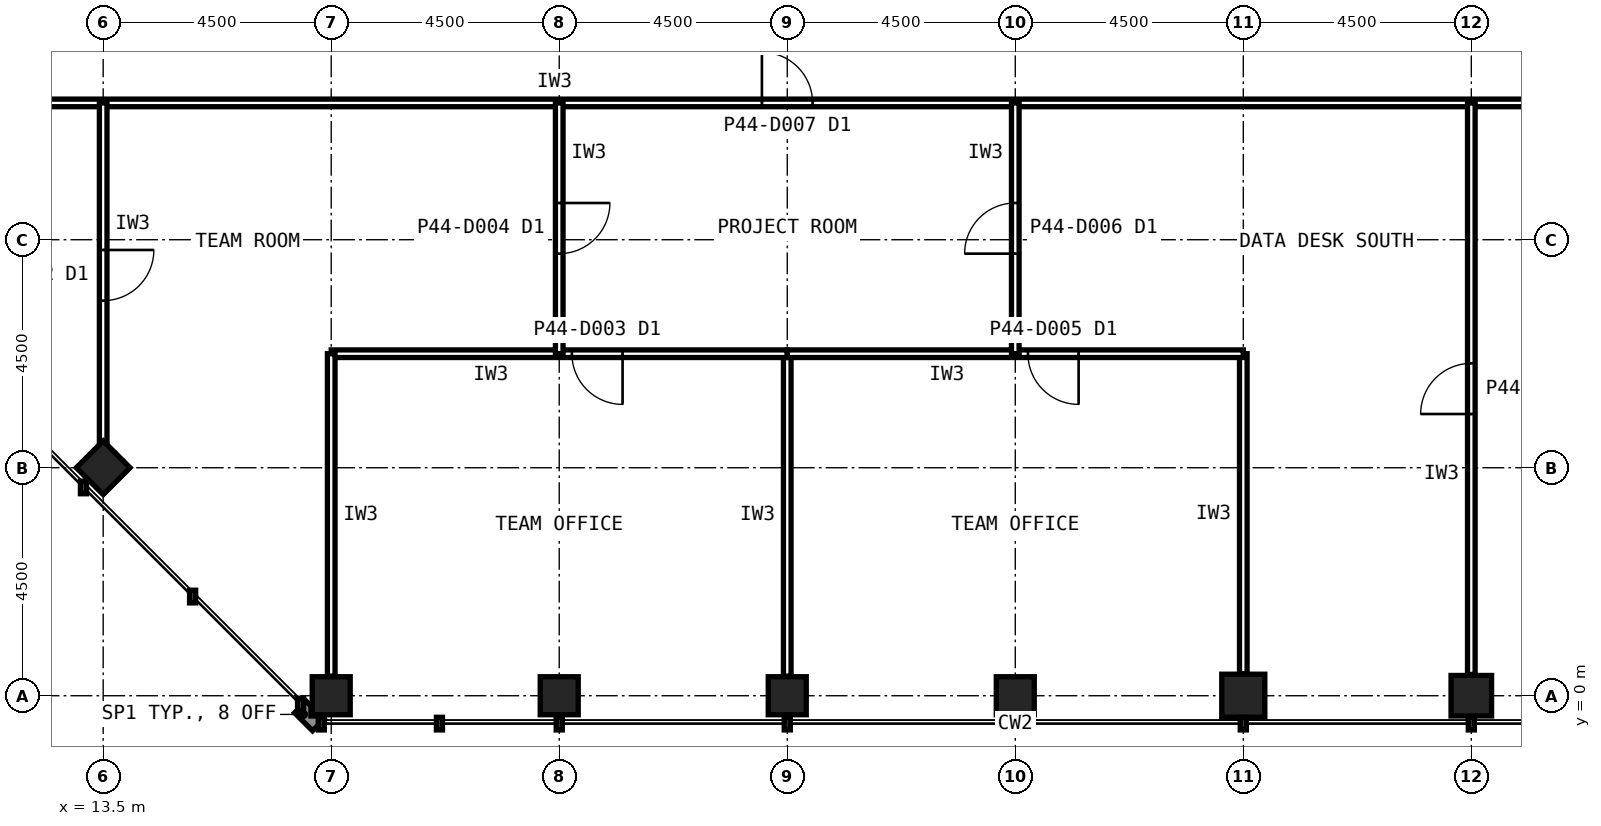
"""IFC4 building model, lengths in metres.
Left out: names, types, materials, properties, quantities, classifications, styles, units other than length and angle.
Written with IfcOpenShell. Run it as: python <this file> out.ifc"""

import sys

from ifc_helpers import new_model, si_unit, direction, frame, frame_2d, origin, origin_2d, place, context, subcontext, project, spatial, rectangle, hollow_rectangle, extrude, element, fill, save


model = new_model("IFC4")
c1 = context("Model", 3, precision=1e-05, world=origin(), true_north=direction((0.0, 1.0)))
c2 = subcontext(c1, "Body", "Model", "MODEL_VIEW")
j1 = project(units=[si_unit("LENGTHUNIT", "METRE"), si_unit("PLANEANGLEUNIT", "RADIAN")], contexts=[c1])
p1 = place(None, origin())
s1 = spatial("IfcSite", under=j1, at=p1, CompositionType="ELEMENT")
p2 = place(p1, origin())
s2 = spatial("IfcBuilding", under=s1, at=p2, CompositionType="ELEMENT")
p3 = place(p2, frame((0.0, 0.0, 183.6)))
s3 = spatial("IfcBuildingStorey", under=s2, at=p3, CompositionType="ELEMENT", Elevation=183.6)
for number, where, z_axis, x_axis in (
    (1, (18.0, 0.0, 0.0), (0.0, 0.0, 1.0), (1.0, 0.0, 0.0)),
    (2, (22.5, 0.0, 0.0), (0.0, 0.0, 1.0), (1.0, 0.0, 0.0)),
    (3, (27.0, 0.0, 0.0), (0.0, 0.0, 1.0), (1.0, 0.0, 0.0)),
    (4, (31.5, 0.0, 0.0), (0.0, 0.0, 1.0), (1.0, 0.0, 0.0)),
):
    element("IfcColumn", number, at=place(p3, frame(where, z_axis=z_axis, x_axis=x_axis)), inside=s3, PredefinedType="COLUMN", context=c2, shape_type="SweptSolid", body=[
        extrude(hollow_rectangle(XDim=0.7, YDim=0.7, WallThickness=0.036, at=origin_2d()), origin(), (0.0, 0.0, 1.0), 4.0),
    ])
p4 = place(p3, frame((36.0, 0.0, 0.0), z_axis=(0.0, 0.0, 1.0), x_axis=(1.0, 0.0, 0.0)))
e5 = element("IfcColumn", 5, at=p4, inside=s3, PredefinedType="COLUMN", context=c2, shape_type="SweptSolid", body=[
    extrude(hollow_rectangle(XDim=0.8, YDim=0.8, WallThickness=0.045, at=origin_2d()), origin(), (0.0, 0.0, 1.0), 4.0),
])
p5 = place(p3, frame((40.5, 0.0, 0.0), z_axis=(0.0, 0.0, 1.0), x_axis=(1.0, 0.0, 0.0)))
e6 = element("IfcColumn", 6, at=p5, inside=s3, PredefinedType="COLUMN", context=c2, shape_type="SweptSolid", body=[
    extrude(hollow_rectangle(XDim=0.75, YDim=0.75, WallThickness=0.04, at=origin_2d()), origin(), (0.0, 0.0, 1.0), 4.0),
])
p6 = place(p3, frame((13.5, 4.5, 0.0), z_axis=(0.0, 0.0, 1.0), x_axis=(0.707106781187, 0.707106781187, 0.0)))
e7 = element("IfcColumn", 7, at=p6, inside=s3, PredefinedType="COLUMN", context=c2, shape_type="SweptSolid", body=[
    extrude(hollow_rectangle(XDim=0.7, YDim=0.7, WallThickness=0.036, at=origin_2d()), origin(), (0.0, 0.0, 1.0), 4.0),
])
p7 = place(p3, frame((11.7, 11.7, 0.0), z_axis=(0.0, 0.0, 1.0), x_axis=(1.0, 0.0, 0.0)))
e8 = element("IfcWall", 8, at=p7, inside=s3, PredefinedType="PARTITIONING", context=c2, shape_type="SweptSolid", body=[
    extrude(rectangle(XDim=30.6, YDim=0.15, at=frame_2d((15.3, 0.0))), origin(), (0.0, 0.0, 1.0), 3.84),
])
p8 = place(p7, frame((14.8, 0.0, 0.0)))
e9 = element("IfcOpeningElement", 9, at=p8, cuts=e8, PredefinedType="OPENING", context=c2, shape_type="SweptSolid", body=[
    extrude(rectangle(XDim=1.0, YDim=2.1, at=frame_2d((0.5, 1.05))), frame((0.0, 0.085, 0.0), z_axis=(0.0, -1.0, 0.0), x_axis=(1.0, 0.0, 0.0)), (0.0, 0.0, 1.0), 0.17),
])
p9 = place(p3, frame((27.0, 0.36, 0.0), z_axis=(0.0, 0.0, 1.0), x_axis=(0.0, 1.0, 0.0)))
e10 = element("IfcWall", 10, at=p9, inside=s3, PredefinedType="PARTITIONING", context=c2, shape_type="SweptSolid", body=[
    extrude(rectangle(XDim=6.39, YDim=0.15, at=frame_2d((3.195, 0.0))), origin(), (0.0, 0.0, 1.0), 2.989),
])
p10 = place(p3, frame((27.0, 6.75, 0.0), z_axis=(0.0, 0.0, 1.0), x_axis=(-1.0, 0.0, 0.0)))
e11 = element("IfcWall", 11, at=p10, inside=s3, PredefinedType="PARTITIONING", context=c2, shape_type="SweptSolid", body=[
    extrude(rectangle(XDim=9.0, YDim=0.15, at=frame_2d((4.5, 0.0))), origin(), (0.0, 0.0, 1.0), 3.84),
])
p11 = place(p10, frame((3.25, 0.0, 0.0)))
e12 = element("IfcOpeningElement", 12, at=p11, cuts=e11, PredefinedType="OPENING", context=c2, shape_type="SweptSolid", body=[
    extrude(rectangle(XDim=1.0, YDim=2.1, at=frame_2d((0.5, 1.05))), frame((0.0, 0.085, 0.0), z_axis=(0.0, -1.0, 0.0), x_axis=(1.0, 0.0, 0.0)), (0.0, 0.0, 1.0), 0.17),
])
p12 = place(p3, frame((18.0, 6.75, 0.0), z_axis=(0.0, 0.0, 1.0), x_axis=(0.0, -1.0, 0.0)))
e13 = element("IfcWall", 13, at=p12, inside=s3, PredefinedType="PARTITIONING", context=c2, shape_type="SweptSolid", body=[
    extrude(rectangle(XDim=6.39, YDim=0.15, at=frame_2d((3.195, 0.0))), origin(), (0.0, 0.0, 1.0), 2.989),
])
p13 = place(p3, frame((36.0, 0.41, 0.0), z_axis=(0.0, 0.0, 1.0), x_axis=(0.0, 1.0, 0.0)))
e14 = element("IfcWall", 14, at=p13, inside=s3, PredefinedType="PARTITIONING", context=c2, shape_type="SweptSolid", body=[
    extrude(rectangle(XDim=6.34, YDim=0.15, at=frame_2d((3.17, 0.0))), origin(), (0.0, 0.0, 1.0), 2.989),
])
p14 = place(p3, frame((36.0, 6.75, 0.0), z_axis=(0.0, 0.0, 1.0), x_axis=(-1.0, 0.0, 0.0)))
e15 = element("IfcWall", 15, at=p14, inside=s3, PredefinedType="PARTITIONING", context=c2, shape_type="SweptSolid", body=[
    extrude(rectangle(XDim=9.0, YDim=0.15, at=frame_2d((4.5, 0.0))), origin(), (0.0, 0.0, 1.0), 3.84),
])
p15 = place(p14, frame((3.25, 0.0, 0.0)))
e16 = element("IfcOpeningElement", 16, at=p15, cuts=e15, PredefinedType="OPENING", context=c2, shape_type="SweptSolid", body=[
    extrude(rectangle(XDim=1.0, YDim=2.1, at=frame_2d((0.5, 1.05))), frame((0.0, 0.085, 0.0), z_axis=(0.0, -1.0, 0.0), x_axis=(1.0, 0.0, 0.0)), (0.0, 0.0, 1.0), 0.17),
])
p16 = place(p3, frame((40.5, 0.395, 0.0), z_axis=(0.0, 0.0, 1.0), x_axis=(0.0, 1.0, 0.0)))
e17 = element("IfcWall", 17, at=p16, inside=s3, PredefinedType="PARTITIONING", context=c2, shape_type="SweptSolid", body=[
    extrude(rectangle(XDim=11.305, YDim=0.15, at=frame_2d((5.652, 0.0))), origin(), (0.0, 0.0, 1.0), 2.989),
])
p17 = place(p16, frame((5.153, 0.0, 0.0)))
e18 = element("IfcOpeningElement", 18, at=p17, cuts=e17, PredefinedType="OPENING", context=c2, shape_type="SweptSolid", body=[
    extrude(rectangle(XDim=1.0, YDim=2.1, at=frame_2d((0.5, 1.05))), frame((0.0, 0.085, 0.0), z_axis=(0.0, -1.0, 0.0), x_axis=(1.0, 0.0, 0.0)), (0.0, 0.0, 1.0), 0.17),
])
p18 = place(p3, frame((31.5, 6.75, 0.0), z_axis=(0.0, 0.0, 1.0), x_axis=(0.0, 1.0, 0.0)))
e19 = element("IfcWall", 19, at=p18, inside=s3, PredefinedType="PARTITIONING", context=c2, shape_type="SweptSolid", body=[
    extrude(rectangle(XDim=4.95, YDim=0.15, at=frame_2d((2.475, 0.0))), origin(), (0.0, 0.0, 1.0), 2.989),
])
p19 = place(p18, frame((1.975, 0.0, 0.0)))
e20 = element("IfcOpeningElement", 20, at=p19, cuts=e19, PredefinedType="OPENING", context=c2, shape_type="SweptSolid", body=[
    extrude(rectangle(XDim=1.0, YDim=2.1, at=frame_2d((0.5, 1.05))), frame((0.0, 0.085, 0.0), z_axis=(0.0, -1.0, 0.0), x_axis=(1.0, 0.0, 0.0)), (0.0, 0.0, 1.0), 0.17),
])
p20 = place(p3, frame((13.5, 11.7, 0.0), z_axis=(0.0, 0.0, 1.0), x_axis=(0.0, -1.0, 0.0)))
e21 = element("IfcWall", 21, at=p20, inside=s3, PredefinedType="PARTITIONING", context=c2, shape_type="SweptSolid", body=[
    extrude(rectangle(XDim=6.83, YDim=0.15, at=frame_2d((3.415, 0.0))), origin(), (0.0, 0.0, 1.0), 2.989),
])
p21 = place(p20, frame((2.915, 0.0, 0.0)))
e22 = element("IfcOpeningElement", 22, at=p21, cuts=e21, PredefinedType="OPENING", context=c2, shape_type="SweptSolid", body=[
    extrude(rectangle(XDim=1.0, YDim=2.1, at=frame_2d((0.5, 1.05))), frame((0.0, 0.085, 0.0), z_axis=(0.0, -1.0, 0.0), x_axis=(1.0, 0.0, 0.0)), (0.0, 0.0, 1.0), 0.17),
])
p22 = place(p3, frame((22.5, 11.7, 0.0), z_axis=(0.0, 0.0, 1.0), x_axis=(0.0, -1.0, 0.0)))
e23 = element("IfcWall", 23, at=p22, inside=s3, PredefinedType="PARTITIONING", context=c2, shape_type="SweptSolid", body=[
    extrude(rectangle(XDim=4.95, YDim=0.15, at=frame_2d((2.475, 0.0))), origin(), (0.0, 0.0, 1.0), 2.989),
])
p23 = place(p22, frame((1.975, 0.0, 0.0)))
e24 = element("IfcOpeningElement", 24, at=p23, cuts=e23, PredefinedType="OPENING", context=c2, shape_type="SweptSolid", body=[
    extrude(rectangle(XDim=1.0, YDim=2.1, at=frame_2d((0.5, 1.05))), frame((0.0, 0.085, 0.0), z_axis=(0.0, -1.0, 0.0), x_axis=(1.0, 0.0, 0.0)), (0.0, 0.0, 1.0), 0.17),
])
p24 = place(p8, origin())
e25 = element("IfcDoor", 25, at=p24, inside=s3, OperationType="SINGLE_SWING_LEFT", PredefinedType="DOOR", context=c2, shape_type="SweptSolid", body=[
    extrude(rectangle(XDim=1.0, YDim=2.1, at=frame_2d((0.5, 1.05))), frame((0.0, 0.025, 0.0), z_axis=(0.0, -1.0, 0.0), x_axis=(1.0, 0.0, 0.0)), (0.0, 0.0, 1.0), 0.05),
])
fill(e9, e25)
p25 = place(p11, origin())
e26 = element("IfcDoor", 26, at=p25, inside=s3, OperationType="SINGLE_SWING_LEFT", PredefinedType="DOOR", context=c2, shape_type="SweptSolid", body=[
    extrude(rectangle(XDim=1.0, YDim=2.1, at=frame_2d((0.5, 1.05))), frame((0.0, 0.025, 0.0), z_axis=(0.0, -1.0, 0.0), x_axis=(1.0, 0.0, 0.0)), (0.0, 0.0, 1.0), 0.05),
])
fill(e12, e26)
p26 = place(p15, origin())
e27 = element("IfcDoor", 27, at=p26, inside=s3, OperationType="SINGLE_SWING_LEFT", PredefinedType="DOOR", context=c2, shape_type="SweptSolid", body=[
    extrude(rectangle(XDim=1.0, YDim=2.1, at=frame_2d((0.5, 1.05))), frame((0.0, 0.025, 0.0), z_axis=(0.0, -1.0, 0.0), x_axis=(1.0, 0.0, 0.0)), (0.0, 0.0, 1.0), 0.05),
])
fill(e16, e27)
p27 = place(p17, origin())
e28 = element("IfcDoor", 28, at=p27, inside=s3, OperationType="SINGLE_SWING_LEFT", PredefinedType="DOOR", context=c2, shape_type="SweptSolid", body=[
    extrude(rectangle(XDim=1.0, YDim=2.1, at=frame_2d((0.5, 1.05))), frame((0.0, 0.025, 0.0), z_axis=(0.0, -1.0, 0.0), x_axis=(1.0, 0.0, 0.0)), (0.0, 0.0, 1.0), 0.05),
])
fill(e18, e28)
p28 = place(p19, origin())
e29 = element("IfcDoor", 29, at=p28, inside=s3, OperationType="SINGLE_SWING_LEFT", PredefinedType="DOOR", context=c2, shape_type="SweptSolid", body=[
    extrude(rectangle(XDim=1.0, YDim=2.1, at=frame_2d((0.5, 1.05))), frame((0.0, 0.025, 0.0), z_axis=(0.0, -1.0, 0.0), x_axis=(1.0, 0.0, 0.0)), (0.0, 0.0, 1.0), 0.05),
])
fill(e20, e29)
p29 = place(p21, origin())
e30 = element("IfcDoor", 30, at=p29, inside=s3, OperationType="SINGLE_SWING_LEFT", PredefinedType="DOOR", context=c2, shape_type="SweptSolid", body=[
    extrude(rectangle(XDim=1.0, YDim=2.1, at=frame_2d((0.5, 1.05))), frame((0.0, 0.025, 0.0), z_axis=(0.0, -1.0, 0.0), x_axis=(1.0, 0.0, 0.0)), (0.0, 0.0, 1.0), 0.05),
])
fill(e22, e30)
p30 = place(p23, origin())
e31 = element("IfcDoor", 31, at=p30, inside=s3, OperationType="SINGLE_SWING_LEFT", PredefinedType="DOOR", context=c2, shape_type="SweptSolid", body=[
    extrude(rectangle(XDim=1.0, YDim=2.1, at=frame_2d((0.5, 1.05))), frame((0.0, 0.025, 0.0), z_axis=(0.0, -1.0, 0.0), x_axis=(1.0, 0.0, 0.0)), (0.0, 0.0, 1.0), 0.05),
])
fill(e24, e31)
save(model, sys.argv[1])
